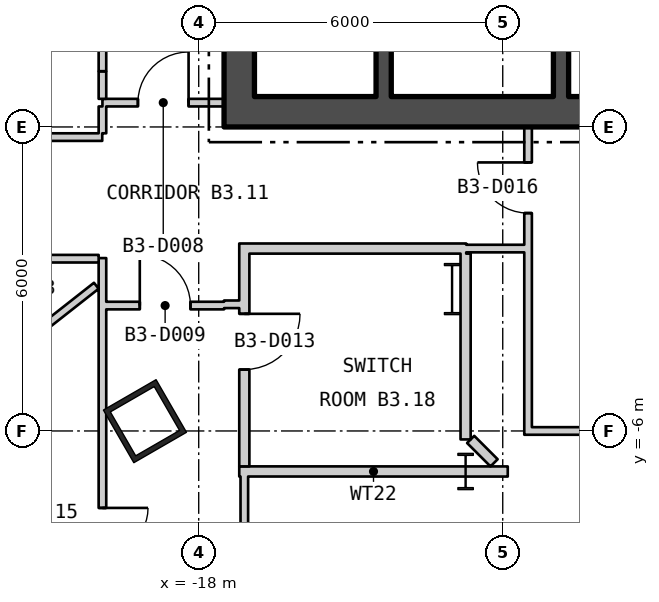
"""IFC4 building model, lengths in metres.
Left out: names, types, materials, properties, quantities, classifications, styles, units other than length and angle.
Written with IfcOpenShell. Run it as: python <this file> out.ifc"""

import sys

from ifc_helpers import new_model, si_unit, direction, frame, frame_2d, origin, origin_2d, place, context, subcontext, project, spatial, rectangle, hollow_rectangle, i_section, extrude, element, fill, save


model = new_model("IFC4")
c1 = context("Model", 3, precision=1e-05, world=origin(), true_north=direction((0.0, 1.0)))
c2 = subcontext(c1, "Body", "Model", "MODEL_VIEW")
j1 = project(units=[si_unit("LENGTHUNIT", "METRE"), si_unit("PLANEANGLEUNIT", "RADIAN")], contexts=[c1])
p1 = place(None, origin())
s1 = spatial("IfcSite", under=j1, at=p1, CompositionType="ELEMENT")
p2 = place(p1, origin())
s2 = spatial("IfcBuilding", under=s1, at=p2, CompositionType="ELEMENT")
p3 = place(p2, frame((0.0, 0.0, -16.8)))
s3 = spatial("IfcBuildingStorey", under=s2, at=p3, CompositionType="ELEMENT", Elevation=-16.8)
p4 = place(p3, frame((-19.061, -5.807, 0.0), z_axis=(0.0, 0.0, 1.0), x_axis=(0.5, -0.866025403784, 0.0)))
e1 = element("IfcColumn", 1, at=p4, inside=s3, PredefinedType="COLUMN", context=c2, shape_type="SweptSolid", body=[
    extrude(hollow_rectangle(XDim=1.2, YDim=1.2, WallThickness=0.1, at=origin_2d()), origin(), (0.0, 0.0, 1.0), 5.4),
])
p5 = place(p3, frame((-13.0, -3.2, 0.0), z_axis=(0.0, 0.0, 1.0), x_axis=(1.0, 0.0, 0.0)))
e2 = element("IfcColumn", 2, at=p5, inside=s3, PredefinedType="COLUMN", context=c2, shape_type="SweptSolid", body=[
    extrude(i_section(OverallWidth=0.302, OverallDepth=1.008, WebThickness=0.021, FlangeThickness=0.04, at=origin_2d()), origin(), (0.0, 0.0, 1.0), 5.4),
])
p6 = place(p3, frame((-12.733, -6.8, 0.0), z_axis=(0.0, 0.0, 1.0), x_axis=(1.0, 0.0, 0.0)))
e3 = element("IfcColumn", 3, at=p6, inside=s3, PredefinedType="COLUMN", context=c2, shape_type="SweptSolid", body=[
    extrude(i_section(OverallWidth=0.304, OverallDepth=0.716, WebThickness=0.021, FlangeThickness=0.04, at=origin_2d()), origin(), (0.0, 0.0, 1.0), 5.4),
])
p7 = place(p3, frame((-17.5, 0.3, 0.0), z_axis=(0.0, 0.0, 1.0), x_axis=(1.0, 0.0, 0.0)))
e4 = element("IfcWall", 4, at=p7, inside=s3, PredefinedType="SHEAR", context=c2, shape_type="SweptSolid", body=[
    extrude(rectangle(XDim=35.0, YDim=0.6, at=frame_2d((17.5, 0.0))), origin(), (0.0, 0.0, 1.0), 4.95),
])
p8 = place(p7, frame((12.0, 0.0, 0.0)))
e5 = element("IfcOpeningElement", 5, at=p8, cuts=e4, PredefinedType="OPENING", context=c2, shape_type="SweptSolid", body=[
    extrude(rectangle(XDim=1.8, YDim=2.4, at=frame_2d((0.9, 1.2))), frame((0.0, 0.31, 0.0), z_axis=(0.0, -1.0, 0.0), x_axis=(1.0, 0.0, 0.0)), (0.0, 0.0, 1.0), 0.62),
])
p9 = place(p7, frame((22.0, 0.0, 0.0)))
e6 = element("IfcOpeningElement", 6, at=p9, cuts=e4, PredefinedType="OPENING", context=c2, shape_type="SweptSolid", body=[
    extrude(rectangle(XDim=1.8, YDim=2.4, at=frame_2d((0.9, 1.2))), frame((0.0, 0.31, 0.0), z_axis=(0.0, -1.0, 0.0), x_axis=(1.0, 0.0, 0.0)), (0.0, 0.0, 1.0), 0.62),
])
p10 = place(p3, frame((-17.2, 0.6, 0.0), z_axis=(0.0, 0.0, 1.0), x_axis=(0.0, 1.0, 0.0)))
e7 = element("IfcWall", 7, at=p10, inside=s3, PredefinedType="SHEAR", context=c2, shape_type="SweptSolid", body=[
    extrude(rectangle(XDim=16.8, YDim=0.6, at=frame_2d((8.4, 0.0))), origin(), (0.0, 0.0, 1.0), 4.95),
])
p11 = place(p10, frame((5.7, 0.0, 0.0)))
e8 = element("IfcOpeningElement", 8, at=p11, cuts=e7, PredefinedType="OPENING", context=c2, shape_type="SweptSolid", body=[
    extrude(rectangle(XDim=1.5, YDim=2.1, at=frame_2d((0.75, 1.05))), frame((0.0, 0.31, 0.0), z_axis=(0.0, -1.0, 0.0), x_axis=(1.0, 0.0, 0.0)), (0.0, 0.0, 1.0), 0.62),
])
p12 = place(p10, frame((1.5, 0.0, 0.0)))
e9 = element("IfcOpeningElement", 9, at=p12, cuts=e7, PredefinedType="OPENING", context=c2, shape_type="SweptSolid", body=[
    extrude(rectangle(XDim=0.9, YDim=2.1, at=frame_2d((0.45, 1.05))), frame((0.0, 0.31, 0.0), z_axis=(0.0, -1.0, 0.0), x_axis=(1.0, 0.0, 0.0)), (0.0, 0.0, 1.0), 0.62),
])
p13 = place(p10, frame((4.3, 0.0, 0.0)))
e10 = element("IfcOpeningElement", 10, at=p13, cuts=e7, PredefinedType="OPENING", context=c2, shape_type="SweptSolid", body=[
    extrude(rectangle(XDim=1.0, YDim=2.1, at=frame_2d((0.5, 1.05))), frame((0.0, 0.31, 0.0), z_axis=(0.0, -1.0, 0.0), x_axis=(1.0, 0.0, 0.0)), (0.0, 0.0, 1.0), 0.62),
])
p14 = place(p10, frame((10.402, 0.0, 0.0)))
e11 = element("IfcOpeningElement", 11, at=p14, cuts=e7, PredefinedType="OPENING", context=c2, shape_type="SweptSolid", body=[
    extrude(rectangle(XDim=0.9, YDim=2.1, at=frame_2d((0.45, 1.05))), frame((0.0, 0.31, 0.0), z_axis=(0.0, -1.0, 0.0), x_axis=(1.0, 0.0, 0.0)), (0.0, 0.0, 1.0), 0.62),
])
p15 = place(p10, frame((15.202, 0.0, 0.0)))
e12 = element("IfcOpeningElement", 12, at=p15, cuts=e7, PredefinedType="OPENING", context=c2, shape_type="SweptSolid", body=[
    extrude(rectangle(XDim=0.9, YDim=2.1, at=frame_2d((0.45, 1.05))), frame((0.0, 0.31, 0.0), z_axis=(0.0, -1.0, 0.0), x_axis=(1.0, 0.0, 0.0)), (0.0, 0.0, 1.0), 0.62),
])
p16 = place(p3, frame((-10.85, 0.6, 0.0), z_axis=(0.0, 0.0, 1.0), x_axis=(0.0, 1.0, 0.0)))
e13 = element("IfcWall", 13, at=p16, inside=s3, PredefinedType="SHEAR", context=c2, shape_type="SweptSolid", body=[
    extrude(rectangle(XDim=16.8, YDim=0.3, at=frame_2d((8.4, 0.0))), origin(), (0.0, 0.0, 1.0), 4.95),
])
p17 = place(p16, frame((5.075, 0.0, 0.0)))
e14 = element("IfcOpeningElement", 14, at=p17, cuts=e13, PredefinedType="OPENING", context=c2, shape_type="SweptSolid", body=[
    extrude(rectangle(XDim=1.25, YDim=2.1, at=frame_2d((0.625, 1.05))), frame((0.0, 0.16, 0.0), z_axis=(0.0, -1.0, 0.0), x_axis=(1.0, 0.0, 0.0)), (0.0, 0.0, 1.0), 0.32),
])
p18 = place(p16, frame((1.525, 0.0, 0.0)))
e15 = element("IfcOpeningElement", 15, at=p18, cuts=e13, PredefinedType="OPENING", context=c2, shape_type="SweptSolid", body=[
    extrude(rectangle(XDim=1.0, YDim=2.1, at=frame_2d((0.5, 1.05))), frame((0.0, 0.16, 0.0), z_axis=(0.0, -1.0, 0.0), x_axis=(1.0, 0.0, 0.0)), (0.0, 0.0, 1.0), 0.32),
])
p19 = place(p3, frame((-14.35, 0.6, 0.0), z_axis=(0.0, 0.0, 1.0), x_axis=(0.0, 1.0, 0.0)))
e16 = element("IfcWall", 16, at=p19, inside=s3, PredefinedType="SHEAR", context=c2, shape_type="SweptSolid", body=[
    extrude(rectangle(XDim=16.8, YDim=0.3, at=frame_2d((8.4, 0.0))), origin(), (0.0, 0.0, 1.0), 4.95),
])
p20 = place(p19, frame((5.7, 0.0, 0.0)))
e17 = element("IfcOpeningElement", 17, at=p20, cuts=e16, PredefinedType="OPENING", context=c2, shape_type="SweptSolid", body=[
    extrude(rectangle(XDim=1.5, YDim=2.1, at=frame_2d((0.75, 1.05))), frame((0.0, 0.16, 0.0), z_axis=(0.0, -1.0, 0.0), x_axis=(1.0, 0.0, 0.0)), (0.0, 0.0, 1.0), 0.32),
])
p21 = place(p3, frame((-26.75, -0.2, 0.0), z_axis=(0.0, 0.0, 1.0), x_axis=(1.0, 0.0, 0.0)))
e18 = element("IfcWall", 18, at=p21, inside=s3, PredefinedType="PARTITIONING", context=c2, shape_type="SweptSolid", body=[
    extrude(rectangle(XDim=6.846, YDim=0.15, at=frame_2d((3.423, 0.0))), origin(), (0.0, 0.0, 1.0), 4.95),
])
p22 = place(p21, frame((3.987, 0.0, 0.0)))
e19 = element("IfcOpeningElement", 19, at=p22, cuts=e18, PredefinedType="OPENING", context=c2, shape_type="SweptSolid", body=[
    extrude(rectangle(XDim=1.8, YDim=2.1, at=frame_2d((0.9, 1.05))), frame((0.0, 0.085, 0.0), z_axis=(0.0, -1.0, 0.0), x_axis=(1.0, 0.0, 0.0)), (0.0, 0.0, 1.0), 0.17),
])
p23 = place(p3, frame((-24.745, -6.846, 0.0), z_axis=(0.0, 0.0, 1.0), x_axis=(0.786295235231, 0.617850955372, 0.0)))
e20 = element("IfcWall", 20, at=p23, inside=s3, PredefinedType="PARTITIONING", context=c2, shape_type="SweptSolid", body=[
    extrude(rectangle(XDim=6.008, YDim=0.15, at=frame_2d((3.004, 0.0))), origin(), (0.0, 0.0, 1.0), 4.95),
])
p24 = place(p3, frame((-23.146, -2.6, 0.0), z_axis=(0.0, 0.0, 1.0), x_axis=(1.0, 0.0, 0.0)))
e21 = element("IfcWall", 21, at=p24, inside=s3, PredefinedType="PARTITIONING", context=c2, shape_type="SweptSolid", body=[
    extrude(rectangle(XDim=3.171, YDim=0.15, at=frame_2d((1.585, 0.0))), origin(), (0.0, 0.0, 1.0), 4.95),
])
p25 = place(p24, frame((1.033, 0.0, 0.0)))
e22 = element("IfcOpeningElement", 22, at=p25, cuts=e21, PredefinedType="OPENING", context=c2, shape_type="SweptSolid", body=[
    extrude(rectangle(XDim=1.0, YDim=2.1, at=frame_2d((0.5, 1.05))), frame((0.0, 0.085, 0.0), z_axis=(0.0, -1.0, 0.0), x_axis=(1.0, 0.0, 0.0)), (0.0, 0.0, 1.0), 0.17),
])
p26 = place(p3, frame((-19.9, -14.627, 0.0), z_axis=(0.0, 0.0, 1.0), x_axis=(0.0, 1.0, 0.0)))
e23 = element("IfcWall", 23, at=p26, inside=s3, PredefinedType="PARTITIONING", context=c2, shape_type="SweptSolid", body=[
    extrude(rectangle(XDim=12.039, YDim=0.15, at=frame_2d((6.019, 0.0))), origin(), (0.0, 0.0, 1.0), 4.95),
])
p27 = place(p26, frame((0.2, 0.0, 0.0)))
e24 = element("IfcOpeningElement", 24, at=p27, cuts=e23, PredefinedType="OPENING", context=c2, shape_type="SweptSolid", body=[
    extrude(rectangle(XDim=1.8, YDim=2.1, at=frame_2d((0.9, 1.05))), frame((0.0, 0.085, 0.0), z_axis=(0.0, -1.0, 0.0), x_axis=(1.0, 0.0, 0.0)), (0.0, 0.0, 1.0), 0.17),
])
p28 = place(p26, frame((5.308, 0.0, 0.0)))
e25 = element("IfcOpeningElement", 25, at=p28, cuts=e23, PredefinedType="OPENING", context=c2, shape_type="SweptSolid", body=[
    extrude(rectangle(XDim=1.8, YDim=2.1, at=frame_2d((0.9, 1.05))), frame((0.0, 0.085, 0.0), z_axis=(0.0, -1.0, 0.0), x_axis=(1.0, 0.0, 0.0)), (0.0, 0.0, 1.0), 0.17),
])
p29 = place(p3, frame((-19.9, -0.125, 0.0), z_axis=(0.0, 0.0, 1.0), x_axis=(0.0, 1.0, 0.0)))
e26 = element("IfcWall", 26, at=p29, inside=s3, PredefinedType="PARTITIONING", context=c2, shape_type="SweptSolid", body=[
    extrude(rectangle(XDim=0.53, YDim=0.15, at=frame_2d((0.265, 0.0))), origin(), (0.0, 0.0, 1.0), 4.95),
])
p30 = place(p3, frame((-19.9, 0.48, 0.0), z_axis=(0.0, 0.0, 1.0), x_axis=(1.0, 0.0, 0.0)))
e27 = element("IfcWall", 27, at=p30, inside=s3, PredefinedType="PARTITIONING", context=c2, shape_type="SweptSolid", body=[
    extrude(rectangle(XDim=2.4, YDim=0.15, at=frame_2d((1.2, 0.0))), origin(), (0.0, 0.0, 1.0), 4.95),
])
p31 = place(p30, frame((0.7, 0.0, 0.0)))
e28 = element("IfcOpeningElement", 28, at=p31, cuts=e27, PredefinedType="OPENING", context=c2, shape_type="SweptSolid", body=[
    extrude(rectangle(XDim=1.0, YDim=2.1, at=frame_2d((0.5, 1.05))), frame((0.0, 0.085, 0.0), z_axis=(0.0, -1.0, 0.0), x_axis=(1.0, 0.0, 0.0)), (0.0, 0.0, 1.0), 0.17),
])
p32 = place(p3, frame((-19.9, 0.555, 0.0), z_axis=(0.0, 0.0, 1.0), x_axis=(0.0, 1.0, 0.0)))
e29 = element("IfcWall", 29, at=p32, inside=s3, PredefinedType="PARTITIONING", context=c2, shape_type="SweptSolid", body=[
    extrude(rectangle(XDim=0.541, YDim=0.15, at=frame_2d((0.271, 0.0))), origin(), (0.0, 0.0, 1.0), 4.95),
])
p33 = place(p3, frame((-19.9, 1.101, 0.0), z_axis=(0.0, 0.0, 1.0), x_axis=(0.0, 1.0, 0.0)))
e30 = element("IfcWall", 30, at=p33, inside=s3, PredefinedType="PARTITIONING", context=c2, shape_type="SweptSolid", body=[
    extrude(rectangle(XDim=16.824, YDim=0.15, at=frame_2d((8.412, 0.0))), origin(), (0.0, 0.0, 1.0), 4.95),
])
p34 = place(p3, frame((-19.825, -3.525, 0.0), z_axis=(0.0, 0.0, 1.0), x_axis=(1.0, 0.0, 0.0)))
e31 = element("IfcWall", 31, at=p34, inside=s3, PredefinedType="PARTITIONING", context=c2, shape_type="SweptSolid", body=[
    extrude(rectangle(XDim=2.325, YDim=0.15, at=frame_2d((1.163, 0.0))), origin(), (0.0, 0.0, 1.0), 4.95),
])
p35 = place(p34, frame((0.662, 0.0, 0.0)))
e32 = element("IfcOpeningElement", 32, at=p35, cuts=e31, PredefinedType="OPENING", context=c2, shape_type="SweptSolid", body=[
    extrude(rectangle(XDim=1.0, YDim=2.1, at=frame_2d((0.5, 1.05))), frame((0.0, 0.085, 0.0), z_axis=(0.0, -1.0, 0.0), x_axis=(1.0, 0.0, 0.0)), (0.0, 0.0, 1.0), 0.17),
])
p36 = place(p3, frame((-17.5, -3.5, 0.0), z_axis=(0.0, 0.0, 1.0), x_axis=(1.0, 0.0, 0.0)))
e33 = element("IfcWall", 33, at=p36, inside=s3, PredefinedType="PARTITIONING", context=c2, shape_type="SweptSolid", body=[
    extrude(rectangle(XDim=0.3, YDim=0.15, at=frame_2d((0.15, 0.0))), origin(), (0.0, 0.0, 1.0), 4.95),
])
p37 = place(p3, frame((-17.2, -6.799, 0.0), z_axis=(0.0, 0.0, 1.0), x_axis=(0.999999982193, -0.000188714848, 0.0)))
e34 = element("IfcWall", 34, at=p37, inside=s3, PredefinedType="PARTITIONING", context=c2, shape_type="SweptSolid", body=[
    extrude(rectangle(XDim=5.299, YDim=0.2, at=frame_2d((2.65, 0.0))), origin(), (0.0, 0.0, 1.0), 4.95),
])
p38 = place(p3, frame((-17.1, -21.225, 0.0), z_axis=(0.0, 0.0, 1.0), x_axis=(0.0, 1.0, 0.0)))
e35 = element("IfcWall", 35, at=p38, inside=s3, PredefinedType="PARTITIONING", context=c2, shape_type="SweptSolid", body=[
    extrude(rectangle(XDim=14.326, YDim=0.15, at=frame_2d((7.163, 0.0))), origin(), (0.0, 0.0, 1.0), 4.95),
])
p39 = place(p3, frame((-17.1, -6.699, 0.0), z_axis=(0.0, 0.0, 1.0), x_axis=(0.0, 1.0, 0.0)))
e36 = element("IfcWall", 36, at=p39, inside=s3, PredefinedType="PARTITIONING", context=c2, shape_type="SweptSolid", body=[
    extrude(rectangle(XDim=4.399, YDim=0.2, at=frame_2d((2.2, 0.0))), origin(), (0.0, 0.0, 1.0), 4.95),
])
p40 = place(p39, frame((1.911, 0.0, 0.0)))
e37 = element("IfcOpeningElement", 37, at=p40, cuts=e36, PredefinedType="OPENING", context=c2, shape_type="SweptSolid", body=[
    extrude(rectangle(XDim=1.1, YDim=2.1, at=frame_2d((0.55, 1.05))), frame((0.0, 0.11, 0.0), z_axis=(0.0, -1.0, 0.0), x_axis=(1.0, 0.0, 0.0)), (0.0, 0.0, 1.0), 0.22),
])
p41 = place(p3, frame((-17.0, -2.4, 0.0), z_axis=(0.0, 0.0, 1.0), x_axis=(1.0, 0.0, 0.0)))
e38 = element("IfcWall", 38, at=p41, inside=s3, PredefinedType="PARTITIONING", context=c2, shape_type="SweptSolid", body=[
    extrude(rectangle(XDim=4.279, YDim=0.2, at=frame_2d((2.139, 0.0))), origin(), (0.0, 0.0, 1.0), 4.95),
])
p42 = place(p3, frame((-12.733, -6.167, 0.0), z_axis=(0.0, 0.0, 1.0), x_axis=(0.0, 1.0, 0.0)))
e39 = element("IfcWall", 39, at=p42, inside=s3, PredefinedType="PARTITIONING", context=c2, shape_type="SweptSolid", body=[
    extrude(rectangle(XDim=3.667, YDim=0.2, at=frame_2d((1.833, 0.0))), origin(), (0.0, 0.0, 1.0), 4.95),
])
p43 = place(p3, frame((-12.721, -2.4, 0.0), z_axis=(0.0, 0.0, 1.0), x_axis=(1.0, 0.0, 0.0)))
e40 = element("IfcWall", 40, at=p43, inside=s3, PredefinedType="PARTITIONING", context=c2, shape_type="SweptSolid", body=[
    extrude(rectangle(XDim=1.146, YDim=0.15, at=frame_2d((0.573, 0.0))), origin(), (0.0, 0.0, 1.0), 4.95),
])
p44 = place(p3, frame((-12.633, -6.167, 0.0), z_axis=(0.0, 0.0, 1.0), x_axis=(0.707106781187, -0.707106781187, 0.0)))
e41 = element("IfcWall", 41, at=p44, inside=s3, PredefinedType="PARTITIONING", context=c2, shape_type="SweptSolid", body=[
    extrude(rectangle(XDim=0.653, YDim=0.2, at=frame_2d((0.327, 0.0))), origin(), (0.0, 0.0, 1.0), 4.95),
])
p45 = place(p3, frame((-11.5, -6.075, 0.0), z_axis=(0.0, 0.0, 1.0), x_axis=(0.0, 1.0, 0.0)))
e42 = element("IfcWall", 42, at=p45, inside=s3, PredefinedType="PARTITIONING", context=c2, shape_type="SweptSolid", body=[
    extrude(rectangle(XDim=6.075, YDim=0.15, at=frame_2d((3.038, 0.0))), origin(), (0.0, 0.0, 1.0), 4.95),
])
p46 = place(p45, frame((4.375, 0.0, 0.0)))
e43 = element("IfcOpeningElement", 43, at=p46, cuts=e42, PredefinedType="OPENING", context=c2, shape_type="SweptSolid", body=[
    extrude(rectangle(XDim=1.0, YDim=2.1, at=frame_2d((0.5, 1.05))), frame((0.0, 0.085, 0.0), z_axis=(0.0, -1.0, 0.0), x_axis=(1.0, 0.0, 0.0)), (0.0, 0.0, 1.0), 0.17),
])
p47 = place(p3, frame((-11.425, -6.0, 0.0), z_axis=(0.0, 0.0, 1.0), x_axis=(1.0, 0.0, 0.0)))
e44 = element("IfcWall", 44, at=p47, inside=s3, PredefinedType="PARTITIONING", context=c2, shape_type="SweptSolid", body=[
    extrude(rectangle(XDim=2.3, YDim=0.15, at=frame_2d((1.15, 0.0))), origin(), (0.0, 0.0, 1.0), 4.95),
])
p48 = place(p28, origin())
e45 = element("IfcDoor", 45, at=p48, inside=s3, OperationType="DOUBLE_DOOR_SINGLE_SWING", PredefinedType="DOOR", context=c2, shape_type="SweptSolid", body=[
    extrude(rectangle(XDim=1.8, YDim=2.1, at=frame_2d((0.9, 1.05))), frame((0.0, 0.025, 0.0), z_axis=(0.0, -1.0, 0.0), x_axis=(1.0, 0.0, 0.0)), (0.0, 0.0, 1.0), 0.05),
])
fill(e25, e45)
p49 = place(p31, origin())
e46 = element("IfcDoor", 46, at=p49, inside=s3, OperationType="SINGLE_SWING_LEFT", PredefinedType="DOOR", context=c2, shape_type="SweptSolid", body=[
    extrude(rectangle(XDim=1.0, YDim=2.1, at=frame_2d((0.5, 1.05))), frame((0.0, 0.025, 0.0), z_axis=(0.0, -1.0, 0.0), x_axis=(1.0, 0.0, 0.0)), (0.0, 0.0, 1.0), 0.05),
])
fill(e28, e46)
p50 = place(p35, origin())
e47 = element("IfcDoor", 47, at=p50, inside=s3, OperationType="SINGLE_SWING_RIGHT", PredefinedType="DOOR", context=c2, shape_type="SweptSolid", body=[
    extrude(rectangle(XDim=1.0, YDim=2.1, at=frame_2d((0.5, 1.05))), frame((0.0, 0.025, 0.0), z_axis=(0.0, -1.0, 0.0), x_axis=(1.0, 0.0, 0.0)), (0.0, 0.0, 1.0), 0.05),
])
fill(e32, e47)
p51 = place(p40, origin())
e48 = element("IfcDoor", 48, at=p51, inside=s3, OperationType="SINGLE_SWING_RIGHT", PredefinedType="DOOR", context=c2, shape_type="SweptSolid", body=[
    extrude(rectangle(XDim=1.1, YDim=2.1, at=frame_2d((0.55, 1.05))), frame((0.0, 0.025, 0.0), z_axis=(0.0, -1.0, 0.0), x_axis=(1.0, 0.0, 0.0)), (0.0, 0.0, 1.0), 0.05),
])
fill(e37, e48)
p52 = place(p46, origin())
e49 = element("IfcDoor", 49, at=p52, inside=s3, OperationType="SINGLE_SWING_LEFT", PredefinedType="DOOR", context=c2, shape_type="SweptSolid", body=[
    extrude(rectangle(XDim=1.0, YDim=2.1, at=frame_2d((0.5, 1.05))), frame((0.0, 0.025, 0.0), z_axis=(0.0, -1.0, 0.0), x_axis=(1.0, 0.0, 0.0)), (0.0, 0.0, 1.0), 0.05),
])
fill(e43, e49)
save(model, sys.argv[1])
